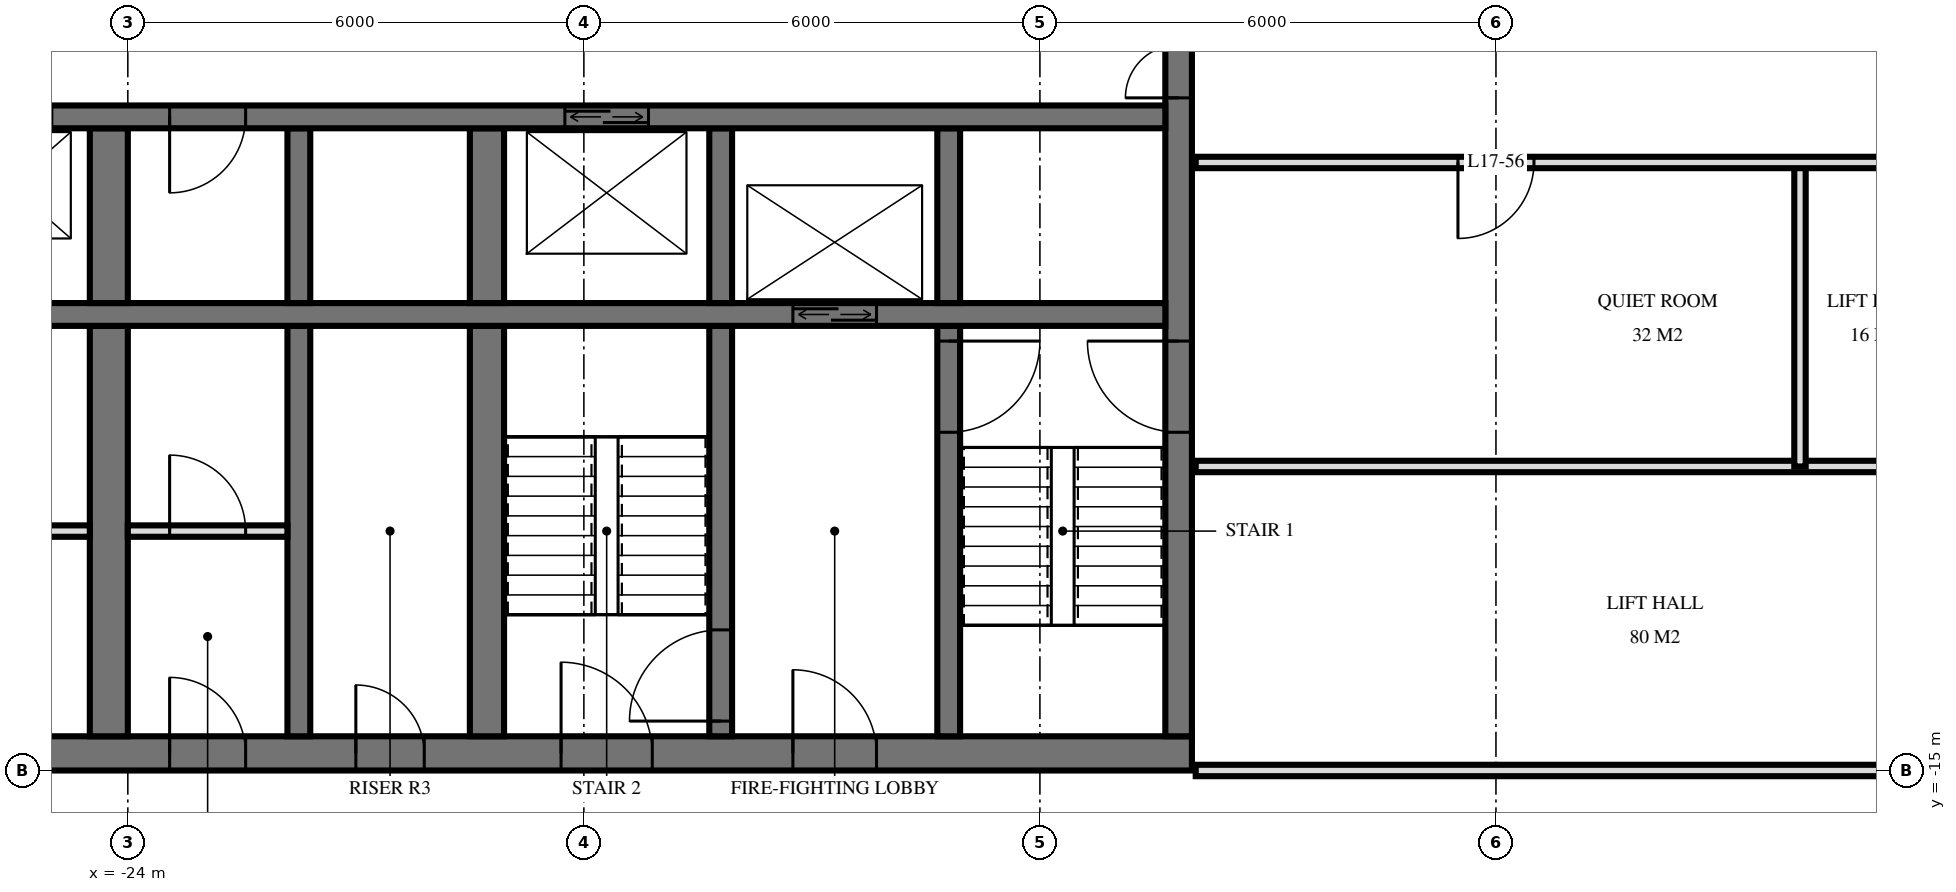
"""IFC4 building model, lengths in metres.
Left out: names, types, materials, properties, quantities, classifications, styles, units other than length and angle.
Written with IfcOpenShell. Run it as: python <this file> out.ifc"""

import sys

from ifc_helpers import new_model, si_unit, direction, frame, frame_2d, origin, place, context, subcontext, project, spatial, rectangle, extrude, element, fill, save


model = new_model("IFC4")
c1 = context("Model", 3, precision=1e-05, world=origin(), true_north=direction((0.0, 1.0)))
c2 = subcontext(c1, "Body", "Model", "MODEL_VIEW")
j1 = project(units=[si_unit("LENGTHUNIT", "METRE"), si_unit("PLANEANGLEUNIT", "RADIAN")], contexts=[c1])
p1 = place(None, origin())
s1 = spatial("IfcSite", under=j1, at=p1, CompositionType="ELEMENT")
p2 = place(p1, origin())
s2 = spatial("IfcBuilding", under=s1, at=p2, CompositionType="ELEMENT")
p3 = place(p2, frame((0.0, 0.0, 70.8)))
s3 = spatial("IfcBuildingStorey", under=s2, at=p3, CompositionType="ELEMENT", Elevation=70.8)
p4 = place(p3, frame((-29.5, -14.775, 0.0), z_axis=(0.0, 0.0, 1.0), x_axis=(1.0, 0.0, 0.0)))
e1 = element("IfcWall", 1, at=p4, inside=s3, PredefinedType="SHEAR", context=c2, shape_type="SweptSolid", body=[
    extrude(rectangle(XDim=19.5, YDim=0.45, at=frame_2d((9.75, 0.0))), origin(), (0.0, 0.0, 1.0), 3.6),
])
p5 = place(p4, frame((11.2, 0.0, 0.0)))
e2 = element("IfcOpeningElement", 2, at=p5, cuts=e1, PredefinedType="OPENING", context=c2, shape_type="SweptSolid", body=[
    extrude(rectangle(XDim=1.2, YDim=2.1, at=frame_2d((0.6, 1.05))), frame((0.0, 0.235, 0.0), z_axis=(0.0, -1.0, 0.0), x_axis=(1.0, 0.0, 0.0)), (0.0, 0.0, 1.0), 0.47),
])
p6 = place(p4, frame((14.25, 0.0, 0.0)))
e3 = element("IfcOpeningElement", 3, at=p6, cuts=e1, PredefinedType="OPENING", context=c2, shape_type="SweptSolid", body=[
    extrude(rectangle(XDim=1.1, YDim=2.1, at=frame_2d((0.55, 1.05))), frame((0.0, 0.235, 0.0), z_axis=(0.0, -1.0, 0.0), x_axis=(1.0, 0.0, 0.0)), (0.0, 0.0, 1.0), 0.47),
])
p7 = place(p4, frame((8.5, 0.0, 0.0)))
e4 = element("IfcOpeningElement", 4, at=p7, cuts=e1, PredefinedType="OPENING", context=c2, shape_type="SweptSolid", body=[
    extrude(rectangle(XDim=0.9, YDim=2.1, at=frame_2d((0.45, 1.05))), frame((0.0, 0.235, 0.0), z_axis=(0.0, -1.0, 0.0), x_axis=(1.0, 0.0, 0.0)), (0.0, 0.0, 1.0), 0.47),
])
p8 = place(p4, frame((6.05, 0.0, 0.0)))
e5 = element("IfcOpeningElement", 5, at=p8, cuts=e1, PredefinedType="OPENING", context=c2, shape_type="SweptSolid", body=[
    extrude(rectangle(XDim=1.0, YDim=2.1, at=frame_2d((0.5, 1.05))), frame((0.0, 0.235, 0.0), z_axis=(0.0, -1.0, 0.0), x_axis=(1.0, 0.0, 0.0)), (0.0, 0.0, 1.0), 0.47),
])
p9 = place(p4, frame((2.25, 0.0, 0.0)))
e6 = element("IfcOpeningElement", 6, at=p9, cuts=e1, PredefinedType="OPENING", context=c2, shape_type="SweptSolid", body=[
    extrude(rectangle(XDim=1.0, YDim=2.1, at=frame_2d((0.5, 1.05))), frame((0.0, 0.235, 0.0), z_axis=(0.0, -1.0, 0.0), x_axis=(1.0, 0.0, 0.0)), (0.0, 0.0, 1.0), 0.47),
])
p10 = place(p3, frame((-10.175, -14.55, 0.0), z_axis=(0.0, 0.0, 1.0), x_axis=(0.0, 1.0, 0.0)))
e7 = element("IfcWall", 7, at=p10, inside=s3, PredefinedType="SHEAR", context=c2, shape_type="SweptSolid", body=[
    extrude(rectangle(XDim=14.1, YDim=0.35, at=frame_2d((7.05, 0.0))), origin(), (0.0, 0.0, 1.0), 3.6),
])
p11 = place(p10, frame((8.4, 0.0, 0.0)))
e8 = element("IfcOpeningElement", 8, at=p11, cuts=e7, PredefinedType="OPENING", context=c2, shape_type="SweptSolid", body=[
    extrude(rectangle(XDim=1.4, YDim=2.4, at=frame_2d((0.7, 1.2))), frame((0.0, 0.185, 0.0), z_axis=(0.0, -1.0, 0.0), x_axis=(1.0, 0.0, 0.0)), (0.0, 0.0, 1.0), 0.37),
])
p12 = place(p10, frame((10.0, 0.0, 0.0)))
e9 = element("IfcOpeningElement", 9, at=p12, cuts=e7, PredefinedType="OPENING", context=c2, shape_type="SweptSolid", body=[
    extrude(rectangle(XDim=1.4, YDim=2.4, at=frame_2d((0.7, 1.2))), frame((0.0, 0.185, 0.0), z_axis=(0.0, -1.0, 0.0), x_axis=(1.0, 0.0, 0.0)), (0.0, 0.0, 1.0), 0.37),
])
p13 = place(p10, frame((4.0, 0.0, 0.0)))
e10 = element("IfcOpeningElement", 10, at=p13, cuts=e7, PredefinedType="OPENING", context=c2, shape_type="SweptSolid", body=[
    extrude(rectangle(XDim=1.2, YDim=2.1, at=frame_2d((0.6, 1.05))), frame((0.0, 0.185, 0.0), z_axis=(0.0, -1.0, 0.0), x_axis=(1.0, 0.0, 0.0)), (0.0, 0.0, 1.0), 0.37),
])
p14 = place(p3, frame((-29.05, -6.4, 0.0), z_axis=(0.0, 0.0, 1.0), x_axis=(1.0, 0.0, 0.0)))
e11 = element("IfcWall", 11, at=p14, inside=s3, PredefinedType="SHEAR", context=c2, shape_type="SweptSolid", body=[
    extrude(rectangle(XDim=18.7, YDim=0.3, at=frame_2d((9.35, 0.0))), origin(), (0.0, 0.0, 1.0), 3.6),
])
p15 = place(p14, frame((2.95, 0.0, 0.0)))
e12 = element("IfcOpeningElement", 12, at=p15, cuts=e11, PredefinedType="OPENING", context=c2, shape_type="SweptSolid", body=[
    extrude(rectangle(XDim=1.1, YDim=2.1, at=frame_2d((0.55, 1.05))), frame((0.0, 0.16, 0.0), z_axis=(0.0, -1.0, 0.0), x_axis=(1.0, 0.0, 0.0)), (0.0, 0.0, 1.0), 0.32),
])
p16 = place(p14, frame((0.55, 0.0, 0.0)))
e13 = element("IfcOpeningElement", 13, at=p16, cuts=e11, PredefinedType="OPENING", context=c2, shape_type="SweptSolid", body=[
    extrude(rectangle(XDim=1.1, YDim=2.1, at=frame_2d((0.55, 1.05))), frame((0.0, 0.16, 0.0), z_axis=(0.0, -1.0, 0.0), x_axis=(1.0, 0.0, 0.0)), (0.0, 0.0, 1.0), 0.32),
])
p17 = place(p14, frame((10.8, 0.0, 0.0)))
e14 = element("IfcOpeningElement", 14, at=p17, cuts=e11, PredefinedType="OPENING", context=c2, shape_type="SweptSolid", body=[
    extrude(rectangle(XDim=1.1, YDim=2.1, at=frame_2d((0.55, 1.05))), frame((0.0, 0.16, 0.0), z_axis=(0.0, -1.0, 0.0), x_axis=(1.0, 0.0, 0.0)), (0.0, 0.0, 1.0), 0.32),
])
p18 = place(p14, frame((5.6, 0.0, 0.0)))
e15 = element("IfcOpeningElement", 15, at=p18, cuts=e11, PredefinedType="OPENING", context=c2, shape_type="SweptSolid", body=[
    extrude(rectangle(XDim=1.0, YDim=2.1, at=frame_2d((0.5, 1.05))), frame((0.0, 0.16, 0.0), z_axis=(0.0, -1.0, 0.0), x_axis=(1.0, 0.0, 0.0)), (0.0, 0.0, 1.0), 0.32),
])
p19 = place(p3, frame((-29.05, -9.0, 0.0), z_axis=(0.0, 0.0, 1.0), x_axis=(1.0, 0.0, 0.0)))
e16 = element("IfcWall", 16, at=p19, inside=s3, PredefinedType="SHEAR", context=c2, shape_type="SweptSolid", body=[
    extrude(rectangle(XDim=18.7, YDim=0.3, at=frame_2d((9.35, 0.0))), origin(), (0.0, 0.0, 1.0), 3.6),
])
p20 = place(p19, frame((13.8, 0.0, 0.0)))
e17 = element("IfcOpeningElement", 17, at=p20, cuts=e16, PredefinedType="OPENING", context=c2, shape_type="SweptSolid", body=[
    extrude(rectangle(XDim=1.1, YDim=2.1, at=frame_2d((0.55, 1.05))), frame((0.0, 0.16, 0.0), z_axis=(0.0, -1.0, 0.0), x_axis=(1.0, 0.0, 0.0)), (0.0, 0.0, 1.0), 0.32),
])
p21 = place(p3, frame((-13.2, -8.85, 0.0), z_axis=(0.0, 0.0, 1.0), x_axis=(0.0, 1.0, 0.0)))
e18 = element("IfcWall", 18, at=p21, inside=s3, PredefinedType="SHEAR", context=c2, shape_type="SweptSolid", body=[
    extrude(rectangle(XDim=2.3, YDim=0.3, at=frame_2d((1.15, 0.0))), origin(), (0.0, 0.0, 1.0), 3.6),
])
p22 = place(p3, frame((-13.2, -14.55, 0.0), z_axis=(0.0, 0.0, 1.0), x_axis=(0.0, 1.0, 0.0)))
e19 = element("IfcWall", 19, at=p22, inside=s3, PredefinedType="SHEAR", context=c2, shape_type="SweptSolid", body=[
    extrude(rectangle(XDim=5.4, YDim=0.3, at=frame_2d((2.7, 0.0))), origin(), (0.0, 0.0, 1.0), 3.6),
])
p23 = place(p22, frame((4.0, 0.0, 0.0)))
e20 = element("IfcOpeningElement", 20, at=p23, cuts=e19, PredefinedType="OPENING", context=c2, shape_type="SweptSolid", body=[
    extrude(rectangle(XDim=1.2, YDim=2.1, at=frame_2d((0.6, 1.05))), frame((0.0, 0.16, 0.0), z_axis=(0.0, -1.0, 0.0), x_axis=(1.0, 0.0, 0.0)), (0.0, 0.0, 1.0), 0.32),
])
p24 = place(p3, frame((-16.2, -8.85, 0.0), z_axis=(0.0, 0.0, 1.0), x_axis=(0.0, 1.0, 0.0)))
e21 = element("IfcWall", 21, at=p24, inside=s3, PredefinedType="SHEAR", context=c2, shape_type="SweptSolid", body=[
    extrude(rectangle(XDim=2.3, YDim=0.3, at=frame_2d((1.15, 0.0))), origin(), (0.0, 0.0, 1.0), 3.6),
])
p25 = place(p3, frame((-16.2, -14.55, 0.0), z_axis=(0.0, 0.0, 1.0), x_axis=(0.0, 1.0, 0.0)))
e22 = element("IfcWall", 22, at=p25, inside=s3, PredefinedType="SHEAR", context=c2, shape_type="SweptSolid", body=[
    extrude(rectangle(XDim=5.4, YDim=0.3, at=frame_2d((2.7, 0.0))), origin(), (0.0, 0.0, 1.0), 3.6),
])
p26 = place(p25, frame((0.2, 0.0, 0.0)))
e23 = element("IfcOpeningElement", 23, at=p26, cuts=e22, PredefinedType="OPENING", context=c2, shape_type="SweptSolid", body=[
    extrude(rectangle(XDim=1.2, YDim=2.1, at=frame_2d((0.6, 1.05))), frame((0.0, 0.16, 0.0), z_axis=(0.0, -1.0, 0.0), x_axis=(1.0, 0.0, 0.0)), (0.0, 0.0, 1.0), 0.32),
])
p27 = place(p3, frame((-19.275, -8.85, 0.0), z_axis=(0.0, 0.0, 1.0), x_axis=(0.0, 1.0, 0.0)))
e24 = element("IfcWall", 24, at=p27, inside=s3, PredefinedType="SHEAR", context=c2, shape_type="SweptSolid", body=[
    extrude(rectangle(XDim=2.3, YDim=0.45, at=frame_2d((1.15, 0.0))), origin(), (0.0, 0.0, 1.0), 3.6),
])
p28 = place(p3, frame((-19.275, -14.55, 0.0), z_axis=(0.0, 0.0, 1.0), x_axis=(0.0, 1.0, 0.0)))
e25 = element("IfcWall", 25, at=p28, inside=s3, PredefinedType="SHEAR", context=c2, shape_type="SweptSolid", body=[
    extrude(rectangle(XDim=5.4, YDim=0.45, at=frame_2d((2.7, 0.0))), origin(), (0.0, 0.0, 1.0), 3.6),
])
p29 = place(p3, frame((-21.75, -8.85, 0.0), z_axis=(0.0, 0.0, 1.0), x_axis=(0.0, 1.0, 0.0)))
e26 = element("IfcWall", 26, at=p29, inside=s3, PredefinedType="SHEAR", context=c2, shape_type="SweptSolid", body=[
    extrude(rectangle(XDim=2.3, YDim=0.3, at=frame_2d((1.15, 0.0))), origin(), (0.0, 0.0, 1.0), 3.6),
])
p30 = place(p3, frame((-21.75, -14.55, 0.0), z_axis=(0.0, 0.0, 1.0), x_axis=(0.0, 1.0, 0.0)))
e27 = element("IfcWall", 27, at=p30, inside=s3, PredefinedType="SHEAR", context=c2, shape_type="SweptSolid", body=[
    extrude(rectangle(XDim=5.4, YDim=0.3, at=frame_2d((2.7, 0.0))), origin(), (0.0, 0.0, 1.0), 3.6),
])
p31 = place(p3, frame((-24.25, -8.85, 0.0), z_axis=(0.0, 0.0, 1.0), x_axis=(0.0, 1.0, 0.0)))
e28 = element("IfcWall", 28, at=p31, inside=s3, PredefinedType="SHEAR", context=c2, shape_type="SweptSolid", body=[
    extrude(rectangle(XDim=2.3, YDim=0.5, at=frame_2d((1.15, 0.0))), origin(), (0.0, 0.0, 1.0), 3.6),
])
p32 = place(p3, frame((-24.25, -14.55, 0.0), z_axis=(0.0, 0.0, 1.0), x_axis=(0.0, 1.0, 0.0)))
e29 = element("IfcWall", 29, at=p32, inside=s3, PredefinedType="SHEAR", context=c2, shape_type="SweptSolid", body=[
    extrude(rectangle(XDim=5.4, YDim=0.5, at=frame_2d((2.7, 0.0))), origin(), (0.0, 0.0, 1.0), 3.6),
])
p33 = place(p3, frame((-24.0, -11.85, 0.0), z_axis=(0.0, 0.0, 1.0), x_axis=(1.0, 0.0, 0.0)))
e30 = element("IfcWall", 30, at=p33, inside=s3, PredefinedType="PARTITIONING", context=c2, shape_type="SweptSolid", body=[
    extrude(rectangle(XDim=2.1, YDim=0.15, at=frame_2d((1.05, 0.0))), origin(), (0.0, 0.0, 1.0), 3.3),
])
p34 = place(p33, frame((0.55, 0.0, 0.0)))
e31 = element("IfcOpeningElement", 31, at=p34, cuts=e30, PredefinedType="OPENING", context=c2, shape_type="SweptSolid", body=[
    extrude(rectangle(XDim=1.0, YDim=2.1, at=frame_2d((0.5, 1.05))), frame((0.0, 0.085, 0.0), z_axis=(0.0, -1.0, 0.0), x_axis=(1.0, 0.0, 0.0)), (0.0, 0.0, 1.0), 0.17),
])
p35 = place(p3, frame((-29.0, -11.85, 0.0), z_axis=(0.0, 0.0, 1.0), x_axis=(1.0, 0.0, 0.0)))
e32 = element("IfcWall", 32, at=p35, inside=s3, PredefinedType="PARTITIONING", context=c2, shape_type="SweptSolid", body=[
    extrude(rectangle(XDim=4.5, YDim=0.15, at=frame_2d((2.25, 0.0))), origin(), (0.0, 0.0, 1.0), 3.3),
])
p36 = place(p35, frame((1.75, 0.0, 0.0)))
e33 = element("IfcOpeningElement", 33, at=p36, cuts=e32, PredefinedType="OPENING", context=c2, shape_type="SweptSolid", body=[
    extrude(rectangle(XDim=1.0, YDim=2.1, at=frame_2d((0.5, 1.05))), frame((0.0, 0.085, 0.0), z_axis=(0.0, -1.0, 0.0), x_axis=(1.0, 0.0, 0.0)), (0.0, 0.0, 1.0), 0.17),
])
p37 = place(p3, frame((-2.0, -11.0, 0.0), z_axis=(0.0, 0.0, 1.0), x_axis=(0.0, 1.0, 0.0)))
e34 = element("IfcWall", 34, at=p37, inside=s3, PredefinedType="PARTITIONING", context=c2, shape_type="SweptSolid", body=[
    extrude(rectangle(XDim=4.0, YDim=0.15, at=frame_2d((2.0, 0.0))), origin(), (0.0, 0.0, 1.0), 3.32),
])
p38 = place(p3, frame((-9.95, -15.0, 0.0), z_axis=(0.0, 0.0, 1.0), x_axis=(1.0, 0.0, 0.0)))
e35 = element("IfcWall", 35, at=p38, inside=s3, PredefinedType="PARTITIONING", context=c2, shape_type="SweptSolid", body=[
    extrude(rectangle(XDim=19.9, YDim=0.15, at=frame_2d((9.95, 0.0))), origin(), (0.0, 0.0, 1.0), 2.684),
])
p39 = place(p38, frame((9.45, 0.0, 0.0)))
e36 = element("IfcOpeningElement", 36, at=p39, cuts=e35, PredefinedType="OPENING", context=c2, shape_type="SweptSolid", body=[
    extrude(rectangle(XDim=1.0, YDim=2.1, at=frame_2d((0.5, 1.05))), frame((0.0, 0.085, 0.0), z_axis=(0.0, -1.0, 0.0), x_axis=(1.0, 0.0, 0.0)), (0.0, 0.0, 1.0), 0.17),
])
p40 = place(p3, frame((-9.95, -11.0, 0.0), z_axis=(0.0, 0.0, 1.0), x_axis=(1.0, 0.0, 0.0)))
e37 = element("IfcWall", 37, at=p40, inside=s3, PredefinedType="PARTITIONING", context=c2, shape_type="SweptSolid", body=[
    extrude(rectangle(XDim=19.9, YDim=0.15, at=frame_2d((9.95, 0.0))), origin(), (0.0, 0.0, 1.0), 3.32),
])
p41 = place(p40, frame((9.45, 0.0, 0.0)))
e38 = element("IfcOpeningElement", 38, at=p41, cuts=e37, PredefinedType="OPENING", context=c2, shape_type="SweptSolid", body=[
    extrude(rectangle(XDim=1.0, YDim=2.1, at=frame_2d((0.5, 1.05))), frame((0.0, 0.085, 0.0), z_axis=(0.0, -1.0, 0.0), x_axis=(1.0, 0.0, 0.0)), (0.0, 0.0, 1.0), 0.17),
])
p42 = place(p40, frame((15.45, 0.0, 0.0)))
e39 = element("IfcOpeningElement", 39, at=p42, cuts=e37, PredefinedType="OPENING", context=c2, shape_type="SweptSolid", body=[
    extrude(rectangle(XDim=1.0, YDim=2.1, at=frame_2d((0.5, 1.05))), frame((0.0, 0.085, 0.0), z_axis=(0.0, -1.0, 0.0), x_axis=(1.0, 0.0, 0.0)), (0.0, 0.0, 1.0), 0.17),
])
p43 = place(p3, frame((-9.95, -7.0, 0.0), z_axis=(0.0, 0.0, 1.0), x_axis=(1.0, 0.0, 0.0)))
e40 = element("IfcWall", 40, at=p43, inside=s3, PredefinedType="PARTITIONING", context=c2, shape_type="SweptSolid", body=[
    extrude(rectangle(XDim=19.9, YDim=0.15, at=frame_2d((9.95, 0.0))), origin(), (0.0, 0.0, 1.0), 3.32),
])
p44 = place(p43, frame((9.45, 0.0, 0.0)))
e41 = element("IfcOpeningElement", 41, at=p44, cuts=e40, PredefinedType="OPENING", context=c2, shape_type="SweptSolid", body=[
    extrude(rectangle(XDim=1.0, YDim=2.1, at=frame_2d((0.5, 1.05))), frame((0.0, 0.085, 0.0), z_axis=(0.0, -1.0, 0.0), x_axis=(1.0, 0.0, 0.0)), (0.0, 0.0, 1.0), 0.17),
])
p45 = place(p43, frame((3.45, 0.0, 0.0)))
e42 = element("IfcOpeningElement", 42, at=p45, cuts=e40, PredefinedType="OPENING", context=c2, shape_type="SweptSolid", body=[
    extrude(rectangle(XDim=1.0, YDim=2.1, at=frame_2d((0.5, 1.05))), frame((0.0, 0.085, 0.0), z_axis=(0.0, -1.0, 0.0), x_axis=(1.0, 0.0, 0.0)), (0.0, 0.0, 1.0), 0.17),
])
p46 = place(p20, origin())
e43 = element("IfcDoor", 43, at=p46, inside=s3, OperationType="DOUBLE_DOOR_SLIDING", PredefinedType="USERDEFINED", context=c2, shape_type="SweptSolid", body=[
    extrude(rectangle(XDim=1.1, YDim=2.1, at=frame_2d((0.55, 1.05))), frame((0.0, 0.025, 0.0), z_axis=(0.0, -1.0, 0.0), x_axis=(1.0, 0.0, 0.0)), (0.0, 0.0, 1.0), 0.05),
])
fill(e17, e43)
p47 = place(p17, origin())
e44 = element("IfcDoor", 44, at=p47, inside=s3, OperationType="DOUBLE_DOOR_SLIDING", PredefinedType="USERDEFINED", context=c2, shape_type="SweptSolid", body=[
    extrude(rectangle(XDim=1.1, YDim=2.1, at=frame_2d((0.55, 1.05))), frame((0.0, 0.025, 0.0), z_axis=(0.0, -1.0, 0.0), x_axis=(1.0, 0.0, 0.0)), (0.0, 0.0, 1.0), 0.05),
])
fill(e14, e44)
p48 = place(p11, origin())
e45 = element("IfcDoor", 45, at=p48, inside=s3, OperationType="DOUBLE_DOOR_SINGLE_SWING", PredefinedType="DOOR", context=c2, shape_type="SweptSolid", body=[
    extrude(rectangle(XDim=1.4, YDim=2.4, at=frame_2d((0.7, 1.2))), frame((0.0, 0.025, 0.0), z_axis=(0.0, -1.0, 0.0), x_axis=(1.0, 0.0, 0.0)), (0.0, 0.0, 1.0), 0.05),
])
fill(e8, e45)
p49 = place(p13, origin())
e46 = element("IfcDoor", 46, at=p49, inside=s3, OperationType="SINGLE_SWING_LEFT", PredefinedType="DOOR", context=c2, shape_type="SweptSolid", body=[
    extrude(rectangle(XDim=1.2, YDim=2.1, at=frame_2d((0.6, 1.05))), frame((0.0, 0.025, 0.0), z_axis=(0.0, -1.0, 0.0), x_axis=(1.0, 0.0, 0.0)), (0.0, 0.0, 1.0), 0.05),
])
fill(e10, e46)
p50 = place(p5, origin())
e47 = element("IfcDoor", 47, at=p50, inside=s3, OperationType="SINGLE_SWING_RIGHT", PredefinedType="DOOR", context=c2, shape_type="SweptSolid", body=[
    extrude(rectangle(XDim=1.2, YDim=2.1, at=frame_2d((0.6, 1.05))), frame((0.0, 0.025, 0.0), z_axis=(0.0, -1.0, 0.0), x_axis=(1.0, 0.0, 0.0)), (0.0, 0.0, 1.0), 0.05),
])
fill(e2, e47)
p51 = place(p6, origin())
e48 = element("IfcDoor", 48, at=p51, inside=s3, OperationType="SINGLE_SWING_RIGHT", PredefinedType="DOOR", context=c2, shape_type="SweptSolid", body=[
    extrude(rectangle(XDim=1.1, YDim=2.1, at=frame_2d((0.55, 1.05))), frame((0.0, 0.025, 0.0), z_axis=(0.0, -1.0, 0.0), x_axis=(1.0, 0.0, 0.0)), (0.0, 0.0, 1.0), 0.05),
])
fill(e3, e48)
p52 = place(p7, origin())
e49 = element("IfcDoor", 49, at=p52, inside=s3, OperationType="SINGLE_SWING_RIGHT", PredefinedType="DOOR", context=c2, shape_type="SweptSolid", body=[
    extrude(rectangle(XDim=0.9, YDim=2.1, at=frame_2d((0.45, 1.05))), frame((0.0, 0.025, 0.0), z_axis=(0.0, -1.0, 0.0), x_axis=(1.0, 0.0, 0.0)), (0.0, 0.0, 1.0), 0.05),
])
fill(e4, e49)
p53 = place(p8, origin())
e50 = element("IfcDoor", 50, at=p53, inside=s3, OperationType="SINGLE_SWING_RIGHT", PredefinedType="DOOR", context=c2, shape_type="SweptSolid", body=[
    extrude(rectangle(XDim=1.0, YDim=2.1, at=frame_2d((0.5, 1.05))), frame((0.0, 0.025, 0.0), z_axis=(0.0, -1.0, 0.0), x_axis=(1.0, 0.0, 0.0)), (0.0, 0.0, 1.0), 0.05),
])
fill(e5, e50)
p54 = place(p18, frame((0.5, 0.0, 0.0), z_axis=(0.0, 0.0, 1.0), x_axis=(-1.0, 0.0, 0.0)))
e51 = element("IfcDoor", 51, at=p54, inside=s3, OperationType="SINGLE_SWING_LEFT", PredefinedType="DOOR", context=c2, shape_type="SweptSolid", body=[
    extrude(rectangle(XDim=1.0, YDim=2.1, at=frame_2d((0.0, 1.05))), frame((0.0, -0.025, 0.0), z_axis=(0.0, 1.0, 0.0), x_axis=(-1.0, 0.0, 0.0)), (0.0, 0.0, 1.0), 0.05),
])
fill(e15, e51)
p55 = place(p23, frame((0.6, 0.0, 0.0), z_axis=(0.0, 0.0, 1.0), x_axis=(-1.0, 0.0, 0.0)))
e52 = element("IfcDoor", 52, at=p55, inside=s3, OperationType="SINGLE_SWING_RIGHT", PredefinedType="DOOR", context=c2, shape_type="SweptSolid", body=[
    extrude(rectangle(XDim=1.2, YDim=2.1, at=frame_2d((0.0, 1.05))), frame((0.0, -0.025, 0.0), z_axis=(0.0, 1.0, 0.0), x_axis=(-1.0, 0.0, 0.0)), (0.0, 0.0, 1.0), 0.05),
])
fill(e20, e52)
p56 = place(p26, origin())
e53 = element("IfcDoor", 53, at=p56, inside=s3, OperationType="SINGLE_SWING_RIGHT", PredefinedType="DOOR", context=c2, shape_type="SweptSolid", body=[
    extrude(rectangle(XDim=1.2, YDim=2.1, at=frame_2d((0.6, 1.05))), frame((0.0, 0.025, 0.0), z_axis=(0.0, -1.0, 0.0), x_axis=(1.0, 0.0, 0.0)), (0.0, 0.0, 1.0), 0.05),
])
fill(e23, e53)
p57 = place(p34, origin())
e54 = element("IfcDoor", 54, at=p57, inside=s3, OperationType="SINGLE_SWING_RIGHT", PredefinedType="DOOR", context=c2, shape_type="SweptSolid", body=[
    extrude(rectangle(XDim=1.0, YDim=2.1, at=frame_2d((0.5, 1.05))), frame((0.0, 0.025, 0.0), z_axis=(0.0, -1.0, 0.0), x_axis=(1.0, 0.0, 0.0)), (0.0, 0.0, 1.0), 0.05),
])
fill(e31, e54)
p58 = place(p45, frame((0.5, 0.0, 0.0), z_axis=(0.0, 0.0, 1.0), x_axis=(-1.0, 0.0, 0.0)))
e55 = element("IfcDoor", 55, at=p58, inside=s3, OperationType="SINGLE_SWING_LEFT", PredefinedType="DOOR", context=c2, shape_type="SweptSolid", body=[
    extrude(rectangle(XDim=1.0, YDim=2.1, at=frame_2d((0.0, 1.05))), frame((0.0, -0.025, 0.0), z_axis=(0.0, 1.0, 0.0), x_axis=(-1.0, 0.0, 0.0)), (0.0, 0.0, 1.0), 0.05),
])
fill(e42, e55)
save(model, sys.argv[1])
